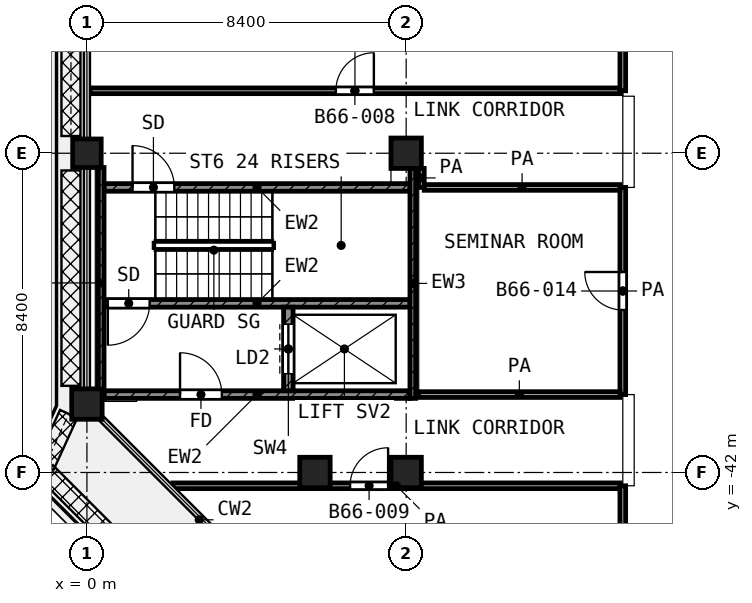
"""IFC4 building model, lengths in metres.
Left out: names, types, materials, properties, quantities, classifications, styles, units other than length and angle.
Written with IfcOpenShell. Run it as: python <this file> out.ifc"""

import sys

from ifc_helpers import new_model, si_unit, direction, frame, frame_2d, origin, origin_2d, place, context, subcontext, project, spatial, rectangle, extrude, element, fill, save


model = new_model("IFC4")
c1 = context("Model", 3, precision=1e-05, world=origin(), true_north=direction((0.0, 1.0)))
c2 = subcontext(c1, "Body", "Model", "MODEL_VIEW")
j1 = project(units=[si_unit("LENGTHUNIT", "METRE"), si_unit("PLANEANGLEUNIT", "RADIAN")], contexts=[c1])
p1 = place(None, origin())
s1 = spatial("IfcSite", under=j1, at=p1, CompositionType="ELEMENT")
p2 = place(p1, origin())
s2 = spatial("IfcBuilding", under=s1, at=p2, CompositionType="ELEMENT")
p3 = place(p2, frame((0.0, 0.0, 286.0)))
s3 = spatial("IfcBuildingStorey", under=s2, at=p3, CompositionType="ELEMENT", Elevation=286.0)
p4 = place(p3, frame((0.0, -33.6, 0.0), z_axis=(0.0, 0.0, 1.0), x_axis=(1.0, 0.0, 0.0)))
e1 = element("IfcColumn", 1, at=p4, inside=s3, PredefinedType="COLUMN", context=c2, shape_type="SweptSolid", body=[
    extrude(rectangle(XDim=0.75, YDim=0.75, at=origin_2d()), origin(), (0.0, 0.0, 1.0), 4.2),
])
for number, where, z_axis, x_axis in (
    (2, (8.4, -33.6, 0.0), (0.0, 0.0, 1.0), (1.0, 0.0, 0.0)),
    (3, (0.0, -40.2, 0.0), (0.0, 0.0, 1.0), (1.0, 0.0, 0.0)),
    (4, (6.0, -42.0, 0.0), (0.0, 0.0, 1.0), (1.0, 0.0, 0.0)),
    (5, (8.4, -42.0, 0.0), (0.0, 0.0, 1.0), (1.0, 0.0, 0.0)),
):
    element("IfcColumn", number, at=place(p3, frame(where, z_axis=z_axis, x_axis=x_axis)), inside=s3, PredefinedType="COLUMN", context=c2, shape_type="SweptSolid", body=[
        extrude(rectangle(XDim=0.8, YDim=0.8, at=origin_2d()), origin(), (0.0, 0.0, 1.0), 4.2),
    ])
p5 = place(p3, frame((0.375, -40.05, 0.0), z_axis=(0.0, 0.0, 1.0), x_axis=(0.0, 1.0, 0.0)))
e6 = element("IfcWall", 6, at=p5, inside=s3, PredefinedType="SHEAR", context=c2, shape_type="SweptSolid", body=[
    extrude(rectangle(XDim=6.075, YDim=0.15, at=frame_2d((3.038, 0.0))), origin(), (0.0, 0.0, 1.0), 3.6),
])
p6 = place(p3, frame((8.575, -40.05, 0.0), z_axis=(0.0, 0.0, 1.0), x_axis=(0.0, 1.0, 0.0)))
e7 = element("IfcWall", 7, at=p6, inside=s3, PredefinedType="SHEAR", context=c2, shape_type="SweptSolid", body=[
    extrude(rectangle(XDim=6.05, YDim=0.15, at=frame_2d((3.025, 0.0))), origin(), (0.0, 0.0, 1.0), 3.6),
])
p7 = place(p3, frame((0.45, -34.5, 0.0), z_axis=(0.0, 0.0, 1.0), x_axis=(1.0, 0.0, 0.0)))
e8 = element("IfcWall", 8, at=p7, inside=s3, PredefinedType="SHEAR", context=c2, shape_type="SweptSolid", body=[
    extrude(rectangle(XDim=8.05, YDim=0.2, at=frame_2d((4.025, 0.0))), origin(), (0.0, 0.0, 1.0), 3.6),
])
p8 = place(p7, frame((0.75, 0.0, 0.0)))
e9 = element("IfcOpeningElement", 9, at=p8, cuts=e8, PredefinedType="OPENING", context=c2, shape_type="SweptSolid", body=[
    extrude(rectangle(XDim=1.1, YDim=2.1, at=frame_2d((0.55, 1.05))), frame((0.0, 0.11, 0.0), z_axis=(0.0, -1.0, 0.0), x_axis=(1.0, 0.0, 0.0)), (0.0, 0.0, 1.0), 0.22),
])
p9 = place(p3, frame((0.45, -37.55, 0.0), z_axis=(0.0, 0.0, 1.0), x_axis=(1.0, 0.0, 0.0)))
e10 = element("IfcWall", 10, at=p9, inside=s3, PredefinedType="SHEAR", context=c2, shape_type="SweptSolid", body=[
    extrude(rectangle(XDim=8.05, YDim=0.2, at=frame_2d((4.025, 0.0))), origin(), (0.0, 0.0, 1.0), 3.6),
])
p10 = place(p9, frame((0.1, 0.0, 0.0)))
e11 = element("IfcOpeningElement", 11, at=p10, cuts=e10, PredefinedType="OPENING", context=c2, shape_type="SweptSolid", body=[
    extrude(rectangle(XDim=1.1, YDim=2.1, at=frame_2d((0.55, 1.05))), frame((0.0, 0.11, 0.0), z_axis=(0.0, -1.0, 0.0), x_axis=(1.0, 0.0, 0.0)), (0.0, 0.0, 1.0), 0.22),
])
p11 = place(p3, frame((0.45, -39.95, 0.0), z_axis=(0.0, 0.0, 1.0), x_axis=(1.0, 0.0, 0.0)))
e12 = element("IfcWall", 12, at=p11, inside=s3, PredefinedType="SHEAR", context=c2, shape_type="SweptSolid", body=[
    extrude(rectangle(XDim=8.05, YDim=0.2, at=frame_2d((4.025, 0.0))), origin(), (0.0, 0.0, 1.0), 3.6),
])
p12 = place(p11, frame((2.0, 0.0, 0.0)))
e13 = element("IfcOpeningElement", 13, at=p12, cuts=e12, PredefinedType="OPENING", context=c2, shape_type="SweptSolid", body=[
    extrude(rectangle(XDim=1.1, YDim=2.1, at=frame_2d((0.55, 1.05))), frame((0.0, 0.11, 0.0), z_axis=(0.0, -1.0, 0.0), x_axis=(1.0, 0.0, 0.0)), (0.0, 0.0, 1.0), 0.22),
])
p13 = place(p3, frame((5.3, -39.85, 0.0), z_axis=(0.0, 0.0, 1.0), x_axis=(0.0, 1.0, 0.0)))
e14 = element("IfcWall", 14, at=p13, inside=s3, PredefinedType="SHEAR", context=c2, shape_type="SweptSolid", body=[
    extrude(rectangle(XDim=2.2, YDim=0.25, at=frame_2d((1.1, 0.0))), origin(), (0.0, 0.0, 1.0), 3.6),
])
p14 = place(p13, frame((0.45, 0.0, 0.0)))
e15 = element("IfcOpeningElement", 15, at=p14, cuts=e14, PredefinedType="OPENING", context=c2, shape_type="SweptSolid", body=[
    extrude(rectangle(XDim=1.3, YDim=2.1, at=frame_2d((0.65, 1.05))), frame((0.0, 0.135, 0.0), z_axis=(0.0, -1.0, 0.0), x_axis=(1.0, 0.0, 0.0)), (0.0, 0.0, 1.0), 0.27),
])
p15 = place(p3, frame((2.263, -42.35, 0.0), z_axis=(0.0, 0.0, 1.0), x_axis=(1.0, 0.0, 0.0)))
e16 = element("IfcWall", 16, at=p15, inside=s3, PredefinedType="PARTITIONING", context=c2, shape_type="SweptSolid", body=[
    extrude(rectangle(XDim=11.762, YDim=0.15, at=frame_2d((5.881, 0.0))), origin(), (0.0, 0.0, 1.0), 3.6),
])
p16 = place(p15, frame((4.662, 0.0, 0.0)))
e17 = element("IfcOpeningElement", 17, at=p16, cuts=e16, PredefinedType="OPENING", context=c2, shape_type="SweptSolid", body=[
    extrude(rectangle(XDim=1.0, YDim=2.1, at=frame_2d((0.5, 1.05))), frame((0.0, 0.085, 0.0), z_axis=(0.0, -1.0, 0.0), x_axis=(1.0, 0.0, 0.0)), (0.0, 0.0, 1.0), 0.17),
])
p17 = place(p3, frame((8.73, -39.95, 0.0), z_axis=(0.0, 0.0, 1.0), x_axis=(1.0, 0.0, 0.0)))
e18 = element("IfcWall", 18, at=p17, inside=s3, PredefinedType="PARTITIONING", context=c2, shape_type="SweptSolid", body=[
    extrude(rectangle(XDim=5.295, YDim=0.15, at=frame_2d((2.647, 0.0))), origin(), (0.0, 0.0, 1.0), 3.6),
])
p18 = place(p3, frame((8.875, -34.5, 0.0), z_axis=(0.0, 0.0, 1.0), x_axis=(1.0, 0.0, 0.0)))
e19 = element("IfcWall", 19, at=p18, inside=s3, PredefinedType="PARTITIONING", context=c2, shape_type="SweptSolid", body=[
    extrude(rectangle(XDim=5.15, YDim=0.15, at=frame_2d((2.575, 0.0))), origin(), (0.0, 0.0, 1.0), 3.6),
])
p19 = place(p3, frame((0.08, -31.957, 0.0), z_axis=(0.0, 0.0, 1.0), x_axis=(1.0, 0.0, 0.0)))
e20 = element("IfcWall", 20, at=p19, inside=s3, PredefinedType="PARTITIONING", context=c2, shape_type="SweptSolid", body=[
    extrude(rectangle(XDim=13.945, YDim=0.15, at=frame_2d((6.972, 0.0))), origin(), (0.0, 0.0, 1.0), 3.6),
])
p20 = place(p19, frame((6.47, 0.0, 0.0)))
e21 = element("IfcOpeningElement", 21, at=p20, cuts=e20, PredefinedType="OPENING", context=c2, shape_type="SweptSolid", body=[
    extrude(rectangle(XDim=1.0, YDim=2.1, at=frame_2d((0.5, 1.05))), frame((0.0, 0.085, 0.0), z_axis=(0.0, -1.0, 0.0), x_axis=(1.0, 0.0, 0.0)), (0.0, 0.0, 1.0), 0.17),
])
p21 = place(p3, frame((8.8, -34.5, 0.0), z_axis=(0.0, 0.0, 1.0), x_axis=(0.0, 1.0, 0.0)))
e22 = element("IfcWall", 22, at=p21, inside=s3, PredefinedType="PARTITIONING", context=c2, shape_type="SweptSolid", body=[
    extrude(rectangle(XDim=0.5, YDim=0.15, at=frame_2d((0.25, 0.0))), origin(), (0.0, 0.0, 1.0), 3.6),
])
p22 = place(p3, frame((14.1, -46.12, 0.0), z_axis=(0.0, 0.0, 1.0), x_axis=(0.0, 1.0, 0.0)))
e23 = element("IfcWall", 23, at=p22, inside=s3, PredefinedType="PARTITIONING", context=c2, shape_type="SweptSolid", body=[
    extrude(rectangle(XDim=3.77, YDim=0.15, at=frame_2d((1.885, 0.0))), origin(), (0.0, 0.0, 1.0), 3.6),
])
p23 = place(p3, frame((14.1, -39.95, 0.0), z_axis=(0.0, 0.0, 1.0), x_axis=(0.0, 1.0, 0.0)))
e24 = element("IfcWall", 24, at=p23, inside=s3, PredefinedType="PARTITIONING", context=c2, shape_type="SweptSolid", body=[
    extrude(rectangle(XDim=5.45, YDim=0.15, at=frame_2d((2.725, 0.0))), origin(), (0.0, 0.0, 1.0), 3.6),
])
p24 = place(p23, frame((2.225, 0.0, 0.0)))
e25 = element("IfcOpeningElement", 25, at=p24, cuts=e24, PredefinedType="OPENING", context=c2, shape_type="SweptSolid", body=[
    extrude(rectangle(XDim=1.0, YDim=2.1, at=frame_2d((0.5, 1.05))), frame((0.0, 0.085, 0.0), z_axis=(0.0, -1.0, 0.0), x_axis=(1.0, 0.0, 0.0)), (0.0, 0.0, 1.0), 0.17),
])
p25 = place(p3, frame((14.1, -31.957, 0.0), z_axis=(0.0, 0.0, 1.0), x_axis=(0.0, 1.0, 0.0)))
e26 = element("IfcWall", 26, at=p25, inside=s3, PredefinedType="PARTITIONING", context=c2, shape_type="SweptSolid", body=[
    extrude(rectangle(XDim=2.557, YDim=0.15, at=frame_2d((1.279, 0.0))), origin(), (0.0, 0.0, 1.0), 3.6),
])
p26 = place(p8, origin())
e27 = element("IfcDoor", 27, at=p26, inside=s3, OperationType="SINGLE_SWING_LEFT", PredefinedType="DOOR", context=c2, shape_type="SweptSolid", body=[
    extrude(rectangle(XDim=1.1, YDim=2.1, at=frame_2d((0.55, 1.05))), frame((0.0, 0.025, 0.0), z_axis=(0.0, -1.0, 0.0), x_axis=(1.0, 0.0, 0.0)), (0.0, 0.0, 1.0), 0.05),
])
fill(e9, e27)
p27 = place(p10, frame((1.1, 0.0, 0.0), z_axis=(0.0, 0.0, 1.0), x_axis=(-1.0, 0.0, 0.0)))
e28 = element("IfcDoor", 28, at=p27, inside=s3, OperationType="SINGLE_SWING_LEFT", PredefinedType="DOOR", context=c2, shape_type="SweptSolid", body=[
    extrude(rectangle(XDim=1.1, YDim=2.1, at=frame_2d((0.55, 1.05))), frame((0.0, 0.025, 0.0), z_axis=(0.0, -1.0, 0.0), x_axis=(1.0, 0.0, 0.0)), (0.0, 0.0, 1.0), 0.05),
])
fill(e11, e28)
p28 = place(p14, origin())
e29 = element("IfcDoor", 29, at=p28, inside=s3, OperationType="DOUBLE_DOOR_SLIDING", PredefinedType="DOOR", context=c2, shape_type="SweptSolid", body=[
    extrude(rectangle(XDim=1.3, YDim=2.1, at=frame_2d((0.65, 1.05))), frame((0.0, 0.025, 0.0), z_axis=(0.0, -1.0, 0.0), x_axis=(1.0, 0.0, 0.0)), (0.0, 0.0, 1.0), 0.05),
])
fill(e15, e29)
p29 = place(p12, origin())
e30 = element("IfcDoor", 30, at=p29, inside=s3, OperationType="SINGLE_SWING_LEFT", PredefinedType="DOOR", context=c2, shape_type="SweptSolid", body=[
    extrude(rectangle(XDim=1.1, YDim=2.1, at=frame_2d((0.55, 1.05))), frame((0.0, 0.025, 0.0), z_axis=(0.0, -1.0, 0.0), x_axis=(1.0, 0.0, 0.0)), (0.0, 0.0, 1.0), 0.05),
])
fill(e13, e30)
p30 = place(p20, origin())
e31 = element("IfcDoor", 31, at=p30, inside=s3, OperationType="SINGLE_SWING_RIGHT", PredefinedType="DOOR", context=c2, shape_type="SweptSolid", body=[
    extrude(rectangle(XDim=1.0, YDim=2.1, at=frame_2d((0.5, 1.05))), frame((0.0, 0.025, 0.0), z_axis=(0.0, -1.0, 0.0), x_axis=(1.0, 0.0, 0.0)), (0.0, 0.0, 1.0), 0.05),
])
fill(e21, e31)
p31 = place(p16, origin())
e32 = element("IfcDoor", 32, at=p31, inside=s3, OperationType="SINGLE_SWING_RIGHT", PredefinedType="DOOR", context=c2, shape_type="SweptSolid", body=[
    extrude(rectangle(XDim=1.0, YDim=2.1, at=frame_2d((0.5, 1.05))), frame((0.0, 0.025, 0.0), z_axis=(0.0, -1.0, 0.0), x_axis=(1.0, 0.0, 0.0)), (0.0, 0.0, 1.0), 0.05),
])
fill(e17, e32)
p32 = place(p24, origin())
e33 = element("IfcDoor", 33, at=p32, inside=s3, OperationType="SINGLE_SWING_RIGHT", PredefinedType="DOOR", context=c2, shape_type="SweptSolid", body=[
    extrude(rectangle(XDim=1.0, YDim=2.1, at=frame_2d((0.5, 1.05))), frame((0.0, 0.025, 0.0), z_axis=(0.0, -1.0, 0.0), x_axis=(1.0, 0.0, 0.0)), (0.0, 0.0, 1.0), 0.05),
])
fill(e25, e33)
save(model, sys.argv[1])
